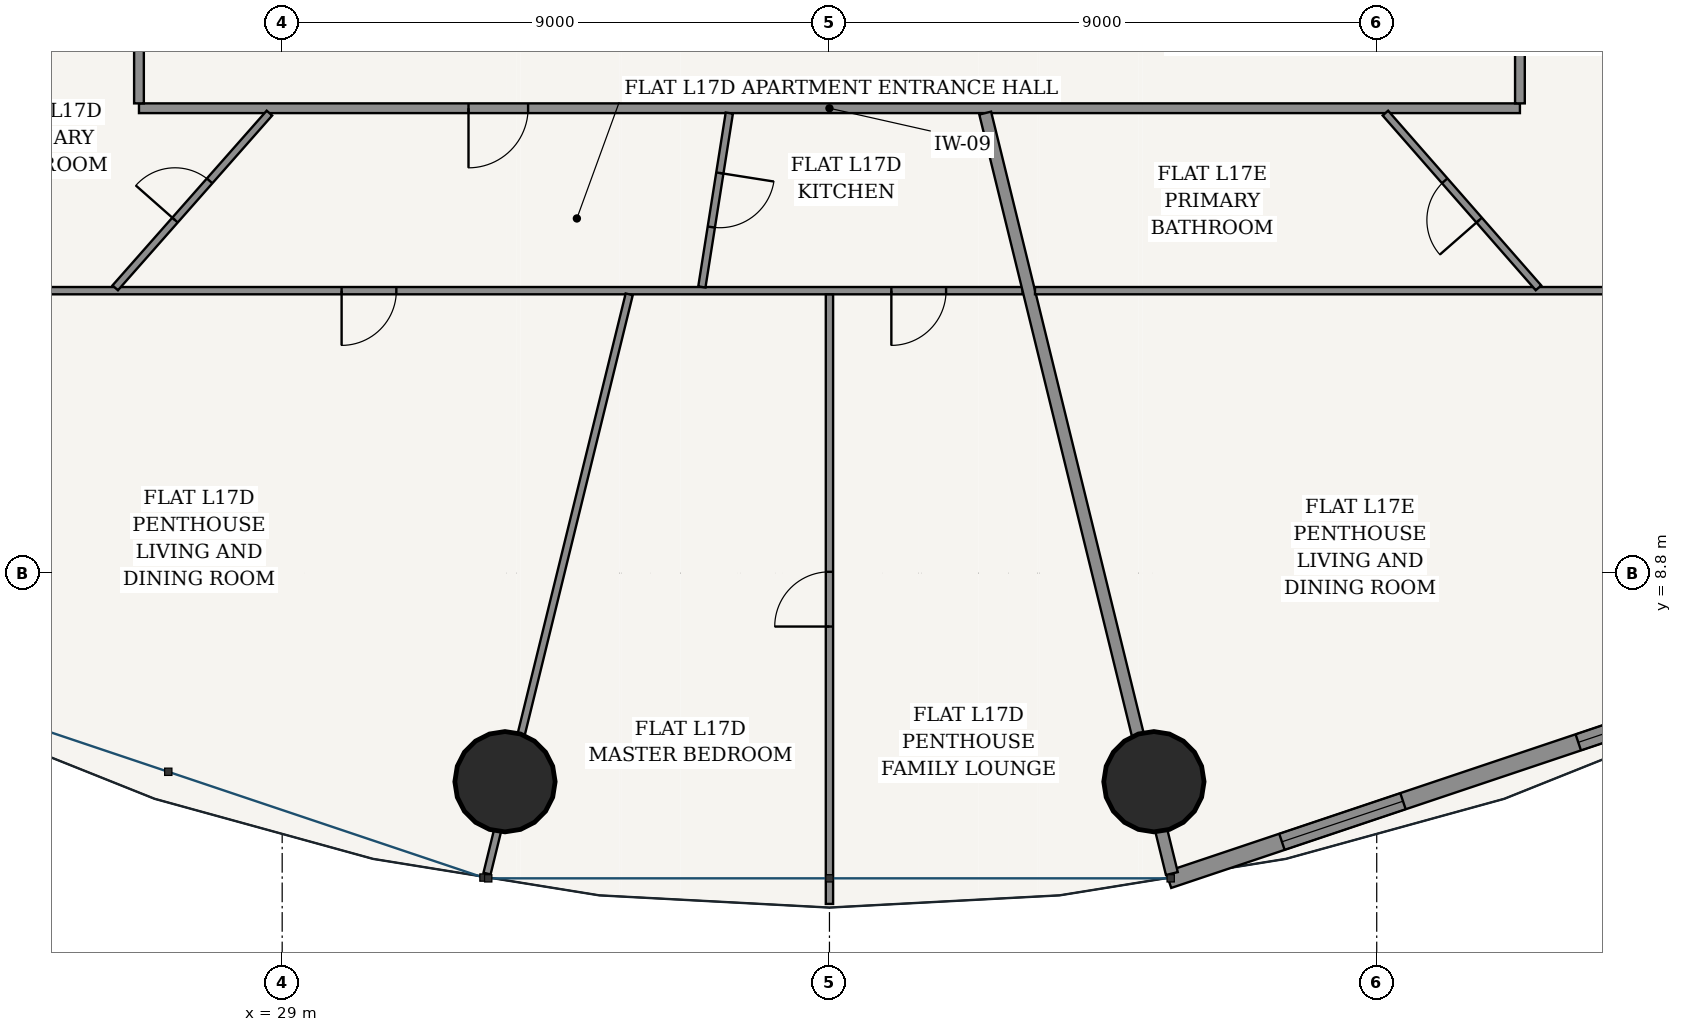
"""IFC4 building model, lengths in metres.
Left out: names, types, materials, properties, quantities, classifications, styles, units other than length and angle.
Written with IfcOpenShell. Run it as: python <this file> out.ifc"""

import sys

from ifc_helpers import new_model, si_unit, direction, frame, frame_2d, origin, origin_2d, place, context, subcontext, project, spatial, rectangle, hollow_circle, extrude, source, transform, mapped, element, fill, save


model = new_model("IFC4")
c1 = context("Model", 3, precision=1e-05, world=origin(), true_north=direction((-0.2419218956, 0.970295726276)))
c2 = subcontext(c1, "Body", "Model", "MODEL_VIEW")
j1 = project(units=[si_unit("LENGTHUNIT", "METRE"), si_unit("PLANEANGLEUNIT", "RADIAN")], contexts=[c1])
p1 = place(None, origin())
s1 = spatial("IfcSite", under=j1, at=p1, CompositionType="ELEMENT")
p2 = place(p1, origin())
s2 = spatial("IfcBuilding", under=s1, at=p2, CompositionType="ELEMENT")
p3 = place(p2, frame((0.0, 0.0, 67.2)))
s3 = spatial("IfcBuildingStorey", under=s2, at=p3, CompositionType="ELEMENT", Elevation=67.2)
for number, where, z_axis, x_axis in (
    (1, (32.664, 5.37, 0.0), (0.0, 0.0, 1.0), (1.0, 0.0, 0.0)),
    (2, (43.336, 5.37, 0.0), (0.0, 0.0, 1.0), (1.0, 0.0, 0.0)),
):
    element("IfcColumn", number, at=place(p3, frame(where, z_axis=z_axis, x_axis=x_axis)), inside=s3, PredefinedType="COLUMN", context=c2, shape_type="SweptSolid", body=[
        extrude(hollow_circle(Radius=0.825, WallThickness=0.05, at=origin_2d()), origin(), (0.0, 0.0, 1.0), 3.6),
    ])
p4 = place(p3, frame((43.576, 3.756, 0.0), z_axis=(0.0, 0.0, 1.0), x_axis=(0.948047847546, 0.31812777113, 0.0)))
e3 = element("IfcWall", 3, at=p4, inside=s3, PredefinedType="SOLIDWALL", context=c2, shape_type="SweptSolid", body=[
    extrude(rectangle(XDim=11.175, YDim=0.28, at=frame_2d((5.588, 0.0))), origin(), (0.0, 0.0, 1.0), 3.32),
])
p5 = place(p4, frame((1.967, 0.0, 0.85)))
e4 = element("IfcOpeningElement", 4, at=p5, cuts=e3, PredefinedType="OPENING", context=c2, shape_type="SweptSolid", body=[
    extrude(rectangle(XDim=2.1, YDim=1.95, at=frame_2d((1.05, 0.975))), frame((0.0, 0.15, 0.0), z_axis=(0.0, -1.0, 0.0), x_axis=(1.0, 0.0, 0.0)), (0.0, 0.0, 1.0), 0.3),
])
p6 = place(p4, frame((7.108, 0.0, 0.85)))
e5 = element("IfcOpeningElement", 5, at=p6, cuts=e3, PredefinedType="OPENING", context=c2, shape_type="SweptSolid", body=[
    extrude(rectangle(XDim=2.1, YDim=1.95, at=frame_2d((1.05, 0.975))), frame((0.0, 0.15, 0.0), z_axis=(0.0, -1.0, 0.0), x_axis=(1.0, 0.0, 0.0)), (0.0, 0.0, 1.0), 0.3),
])
p7 = place(p3, frame((26.645, 16.445, 0.0), z_axis=(0.0, 0.0, 1.0), x_axis=(1.0, 0.0, 0.0)))
e6 = element("IfcWall", 6, at=p7, inside=s3, PredefinedType="PARTITIONING", context=c2, shape_type="SweptSolid", body=[
    extrude(rectangle(XDim=22.71, YDim=0.16, at=frame_2d((11.355, 0.0))), origin(), (0.0, 0.0, 1.0), 2.688),
])
p8 = place(p7, frame((5.419, 0.0, 0.0)))
e7 = element("IfcOpeningElement", 7, at=p8, cuts=e6, PredefinedType="OPENING", context=c2, shape_type="SweptSolid", body=[
    extrude(rectangle(XDim=0.98, YDim=2.2, at=frame_2d((0.49, 1.1))), frame((0.0, 0.09, 0.0), z_axis=(0.0, -1.0, 0.0), x_axis=(1.0, 0.0, 0.0)), (0.0, 0.0, 1.0), 0.18),
])
p9 = place(p3, frame((26.645, 16.525, 0.0), z_axis=(0.0, 0.0, 1.0), x_axis=(0.0, 1.0, 0.0)))
e8 = element("IfcWall", 8, at=p9, inside=s3, PredefinedType="PARTITIONING", context=c2, shape_type="SweptSolid", body=[
    extrude(rectangle(XDim=20.55, YDim=0.16, at=frame_2d((10.275, 0.0))), origin(), (0.0, 0.0, 1.0), 2.688),
])
p10 = place(p9, frame((16.199, 0.0, 0.0)))
e9 = element("IfcOpeningElement", 9, at=p10, cuts=e8, PredefinedType="OPENING", context=c2, shape_type="SweptSolid", body=[
    extrude(rectangle(XDim=0.98, YDim=2.2, at=frame_2d((0.49, 1.1))), frame((0.0, 0.09, 0.0), z_axis=(0.0, -1.0, 0.0), x_axis=(1.0, 0.0, 0.0)), (0.0, 0.0, 1.0), 0.18),
])
p11 = place(p3, frame((49.355, 16.525, 0.0), z_axis=(0.0, 0.0, 1.0), x_axis=(0.0, 1.0, 0.0)))
e10 = element("IfcWall", 10, at=p11, inside=s3, PredefinedType="PARTITIONING", context=c2, shape_type="SweptSolid", body=[
    extrude(rectangle(XDim=20.55, YDim=0.16, at=frame_2d((10.275, 0.0))), origin(), (0.0, 0.0, 1.0), 2.688),
])
p12 = place(p11, frame((16.537, 0.0, 0.0)))
e11 = element("IfcOpeningElement", 11, at=p12, cuts=e10, PredefinedType="OPENING", context=c2, shape_type="SweptSolid", body=[
    extrude(rectangle(XDim=0.98, YDim=2.2, at=frame_2d((0.49, 1.1))), frame((0.0, 0.09, 0.0), z_axis=(0.0, -1.0, 0.0), x_axis=(1.0, 0.0, 0.0)), (0.0, 0.0, 1.0), 0.18),
])
p13 = place(p11, frame((2.945, 0.0, 0.0)))
e12 = element("IfcOpeningElement", 12, at=p13, cuts=e10, PredefinedType="OPENING", context=c2, shape_type="SweptSolid", body=[
    extrude(rectangle(XDim=0.98, YDim=2.2, at=frame_2d((0.49, 1.1))), frame((0.0, 0.09, 0.0), z_axis=(0.0, -1.0, 0.0), x_axis=(1.0, 0.0, 0.0)), (0.0, 0.0, 1.0), 0.18),
])
p14 = place(p3, frame((26.565, 20.608, 0.0), z_axis=(0.0, 0.0, 1.0), x_axis=(-0.879369737803, -0.476139542819, 0.0)))
e13 = element("IfcWall", 13, at=p14, inside=s3, PredefinedType="PARTITIONING", context=c2, shape_type="SweptSolid", body=[
    extrude(rectangle(XDim=14.295, YDim=0.2, at=frame_2d((7.147, 0.0))), origin(), (0.0, 0.0, 1.0), 2.688),
])
p15 = place(p3, frame((41.176, 13.445, 0.0), z_axis=(0.0, 0.0, 1.0), x_axis=(-1.0, 0.0, 0.0)))
e14 = element("IfcWall", 14, at=p15, inside=s3, PredefinedType="PARTITIONING", context=c2, shape_type="SweptSolid", body=[
    extrude(rectangle(XDim=17.531, YDim=0.12, at=frame_2d((8.766, 0.0))), origin(), (0.0, 0.0, 1.0), 2.688),
])
p16 = place(p15, frame((10.299, 0.0, 0.0)))
e15 = element("IfcOpeningElement", 15, at=p16, cuts=e14, PredefinedType="OPENING", context=c2, shape_type="SweptSolid", body=[
    extrude(rectangle(XDim=0.9, YDim=2.15, at=frame_2d((0.45, 1.075))), frame((0.0, 0.07, 0.0), z_axis=(0.0, -1.0, 0.0), x_axis=(1.0, 0.0, 0.0)), (0.0, 0.0, 1.0), 0.14),
])
p17 = place(p15, frame((1.258, 0.0, 0.0)))
e16 = element("IfcOpeningElement", 16, at=p17, cuts=e14, PredefinedType="OPENING", context=c2, shape_type="SweptSolid", body=[
    extrude(rectangle(XDim=0.9, YDim=2.15, at=frame_2d((0.45, 1.075))), frame((0.0, 0.07, 0.0), z_axis=(0.0, -1.0, 0.0), x_axis=(1.0, 0.0, 0.0)), (0.0, 0.0, 1.0), 0.14),
])
p18 = place(p3, frame((34.707, 13.385, 0.0), z_axis=(0.0, 0.0, 1.0), x_axis=(-0.238386763388, -0.971170299711, 0.0)))
e17 = element("IfcWall", 17, at=p18, inside=s3, PredefinedType="PARTITIONING", context=c2, shape_type="SweptSolid", body=[
    extrude(rectangle(XDim=9.808, YDim=0.12, at=frame_2d((4.904, 0.0))), origin(), (0.0, 0.0, 1.0), 2.688),
])
p19 = place(p3, frame((38.0, 13.383, 0.0), z_axis=(0.0, 0.0, 1.0), x_axis=(0.0, -1.0, 0.0)))
e18 = element("IfcWall", 18, at=p19, inside=s3, PredefinedType="PARTITIONING", context=c2, shape_type="SweptSolid", body=[
    extrude(rectangle(XDim=10.023, YDim=0.12, at=frame_2d((5.011, 0.0))), origin(), (0.0, 0.0, 1.0), 2.762),
])
p20 = place(p19, frame((4.562, 0.0, 0.0)))
e19 = element("IfcOpeningElement", 19, at=p20, cuts=e18, PredefinedType="OPENING", context=c2, shape_type="SweptSolid", body=[
    extrude(rectangle(XDim=0.9, YDim=2.15, at=frame_2d((0.45, 1.075))), frame((0.0, 0.07, 0.0), z_axis=(0.0, -1.0, 0.0), x_axis=(1.0, 0.0, 0.0)), (0.0, 0.0, 1.0), 0.14),
])
p21 = place(p3, frame((28.79, 16.365, 0.0), z_axis=(0.0, 0.0, 1.0), x_axis=(-0.661718545222, -0.749752337048, 0.0)))
e20 = element("IfcWall", 20, at=p21, inside=s3, PredefinedType="PARTITIONING", context=c2, shape_type="SweptSolid", body=[
    extrude(rectangle(XDim=3.833, YDim=0.12, at=frame_2d((1.917, 0.0))), origin(), (0.0, 0.0, 1.0), 2.999),
])
p22 = place(p21, frame((1.486, 0.0, 0.0)))
e21 = element("IfcOpeningElement", 21, at=p22, cuts=e20, PredefinedType="OPENING", context=c2, shape_type="SweptSolid", body=[
    extrude(rectangle(XDim=0.86, YDim=2.15, at=frame_2d((0.43, 1.075))), frame((0.0, 0.07, 0.0), z_axis=(0.0, -1.0, 0.0), x_axis=(1.0, 0.0, 0.0)), (0.0, 0.0, 1.0), 0.14),
])
p23 = place(p3, frame((36.353, 16.365, 0.0), z_axis=(0.0, 0.0, 1.0), x_axis=(-0.155897593005, -0.987773223212, 0.0)))
e22 = element("IfcWall", 22, at=p23, inside=s3, PredefinedType="PARTITIONING", context=c2, shape_type="SweptSolid", body=[
    extrude(rectangle(XDim=2.894, YDim=0.12, at=frame_2d((1.447, 0.0))), origin(), (0.0, 0.0, 1.0), 3.32),
])
p24 = place(p23, frame((0.997, 0.0, 0.0)))
e23 = element("IfcOpeningElement", 23, at=p24, cuts=e22, PredefinedType="OPENING", context=c2, shape_type="SweptSolid", body=[
    extrude(rectangle(XDim=0.9, YDim=2.15, at=frame_2d((0.45, 1.075))), frame((0.0, 0.07, 0.0), z_axis=(0.0, -1.0, 0.0), x_axis=(1.0, 0.0, 0.0)), (0.0, 0.0, 1.0), 0.14),
])
p25 = place(p3, frame((40.562, 16.365, 0.0), z_axis=(0.0, 0.0, 1.0), x_axis=(0.238380116209, -0.971171931326, 0.0)))
e24 = element("IfcWall", 24, at=p25, inside=s3, PredefinedType="PARTITIONING", context=c2, shape_type="SweptSolid", body=[
    extrude(rectangle(XDim=12.877, YDim=0.2, at=frame_2d((6.438, 0.0))), origin(), (0.0, 0.0, 1.0), 2.688),
])
p26 = place(p3, frame((52.355, 13.445, 0.0), z_axis=(0.0, 0.0, 1.0), x_axis=(-1.0, 0.0, 0.0)))
e25 = element("IfcWall", 25, at=p26, inside=s3, PredefinedType="PARTITIONING", context=c2, shape_type="SweptSolid", body=[
    extrude(rectangle(XDim=10.975, YDim=0.12, at=frame_2d((5.487, 0.0))), origin(), (0.0, 0.0, 1.0), 2.688),
])
p27 = place(p3, frame((47.143, 16.365, 0.0), z_axis=(0.0, 0.0, 1.0), x_axis=(0.659015717138, -0.752129167474, 0.0)))
e26 = element("IfcWall", 26, at=p27, inside=s3, PredefinedType="PARTITIONING", context=c2, shape_type="SweptSolid", body=[
    extrude(rectangle(XDim=3.82, YDim=0.12, at=frame_2d((1.91, 0.0))), origin(), (0.0, 0.0, 1.0), 2.999),
])
p28 = place(p27, frame((1.48, 0.0, 0.0)))
e27 = element("IfcOpeningElement", 27, at=p28, cuts=e26, PredefinedType="OPENING", context=c2, shape_type="SweptSolid", body=[
    extrude(rectangle(XDim=0.86, YDim=2.15, at=frame_2d((0.43, 1.075))), frame((0.0, 0.07, 0.0), z_axis=(0.0, -1.0, 0.0), x_axis=(1.0, 0.0, 0.0)), (0.0, 0.0, 1.0), 0.14),
])
m1 = source(origin(), c2, "Body", "SweptSolid", [
    extrude(rectangle(XDim=2.1, YDim=1.95, at=frame_2d((1.05, 0.975))), frame((0.0, 0.03, 0.0), z_axis=(0.0, -1.0, 0.0), x_axis=(1.0, 0.0, 0.0)), (0.0, 0.0, 1.0), 0.06),
])
p29 = place(p5, origin())
e28 = element("IfcWindow", 28, at=p29, inside=s3, PartitioningType="SINGLE_PANEL", PredefinedType="WINDOW", context=c2, shape_type="MappedRepresentation", body=[
    mapped(m1, transform((0.0, 0.0, 0.0), scale=1.0)),
])
fill(e4, e28)
p30 = place(p6, origin())
e29 = element("IfcWindow", 29, at=p30, inside=s3, PartitioningType="SINGLE_PANEL", PredefinedType="WINDOW", context=c2, shape_type="MappedRepresentation", body=[
    mapped(m1, transform((0.0, 0.0, 0.0), scale=1.0)),
])
fill(e5, e29)
m2 = source(origin(), c2, "Body", "SweptSolid", [
    extrude(rectangle(XDim=0.98, YDim=2.2, at=frame_2d((0.49, 1.1))), frame((0.0, 0.025, 0.0), z_axis=(0.0, -1.0, 0.0), x_axis=(1.0, 0.0, 0.0)), (0.0, 0.0, 1.0), 0.05),
])
p31 = place(p8, frame((0.98, 0.0, 0.0), z_axis=(0.0, 0.0, 1.0), x_axis=(-1.0, 0.0, 0.0)))
e30 = element("IfcDoor", 30, at=p31, inside=s3, OperationType="SINGLE_SWING_RIGHT", PredefinedType="DOOR", context=c2, shape_type="MappedRepresentation", body=[
    mapped(m2, transform((0.0, 0.0, 0.0), scale=1.0)),
])
fill(e7, e30)
m3 = source(origin(), c2, "Body", "SweptSolid", [
    extrude(rectangle(XDim=0.86, YDim=2.15, at=frame_2d((0.43, 1.075))), frame((0.0, 0.025, 0.0), z_axis=(0.0, -1.0, 0.0), x_axis=(1.0, 0.0, 0.0)), (0.0, 0.0, 1.0), 0.05),
])
p32 = place(p22, frame((0.86, 0.0, 0.0), z_axis=(0.0, 0.0, 1.0), x_axis=(-1.0, 0.0, 0.0)))
e31 = element("IfcDoor", 31, at=p32, inside=s3, OperationType="SINGLE_SWING_LEFT", PredefinedType="DOOR", context=c2, shape_type="MappedRepresentation", body=[
    mapped(m3, transform((0.0, 0.0, 0.0), scale=1.0)),
])
fill(e21, e31)
m4 = source(origin(), c2, "Body", "SweptSolid", [
    extrude(rectangle(XDim=0.9, YDim=2.15, at=frame_2d((0.45, 1.075))), frame((0.0, 0.025, 0.0), z_axis=(0.0, -1.0, 0.0), x_axis=(1.0, 0.0, 0.0)), (0.0, 0.0, 1.0), 0.05),
])
p33 = place(p16, origin())
e32 = element("IfcDoor", 32, at=p33, inside=s3, OperationType="SINGLE_SWING_RIGHT", PredefinedType="DOOR", context=c2, shape_type="MappedRepresentation", body=[
    mapped(m4, transform((0.0, 0.0, 0.0), scale=1.0)),
])
fill(e15, e32)
p34 = place(p24, origin())
e33 = element("IfcDoor", 33, at=p34, inside=s3, OperationType="SINGLE_SWING_LEFT", PredefinedType="DOOR", context=c2, shape_type="MappedRepresentation", body=[
    mapped(m4, transform((0.0, 0.0, 0.0), scale=1.0)),
])
fill(e23, e33)
p35 = place(p17, origin())
e34 = element("IfcDoor", 34, at=p35, inside=s3, OperationType="SINGLE_SWING_RIGHT", PredefinedType="DOOR", context=c2, shape_type="MappedRepresentation", body=[
    mapped(m4, transform((0.0, 0.0, 0.0), scale=1.0)),
])
fill(e16, e34)
p36 = place(p20, frame((0.9, 0.0, 0.0), z_axis=(0.0, 0.0, 1.0), x_axis=(-1.0, 0.0, 0.0)))
e35 = element("IfcDoor", 35, at=p36, inside=s3, OperationType="SINGLE_SWING_LEFT", PredefinedType="DOOR", context=c2, shape_type="MappedRepresentation", body=[
    mapped(m4, transform((0.0, 0.0, 0.0), scale=1.0)),
])
fill(e19, e35)
p37 = place(p28, frame((0.86, 0.0, 0.0), z_axis=(0.0, 0.0, 1.0), x_axis=(-1.0, 0.0, 0.0)))
e36 = element("IfcDoor", 36, at=p37, inside=s3, OperationType="SINGLE_SWING_LEFT", PredefinedType="DOOR", context=c2, shape_type="MappedRepresentation", body=[
    mapped(m3, transform((0.0, 0.0, 0.0), scale=1.0)),
])
fill(e27, e36)
save(model, sys.argv[1])
